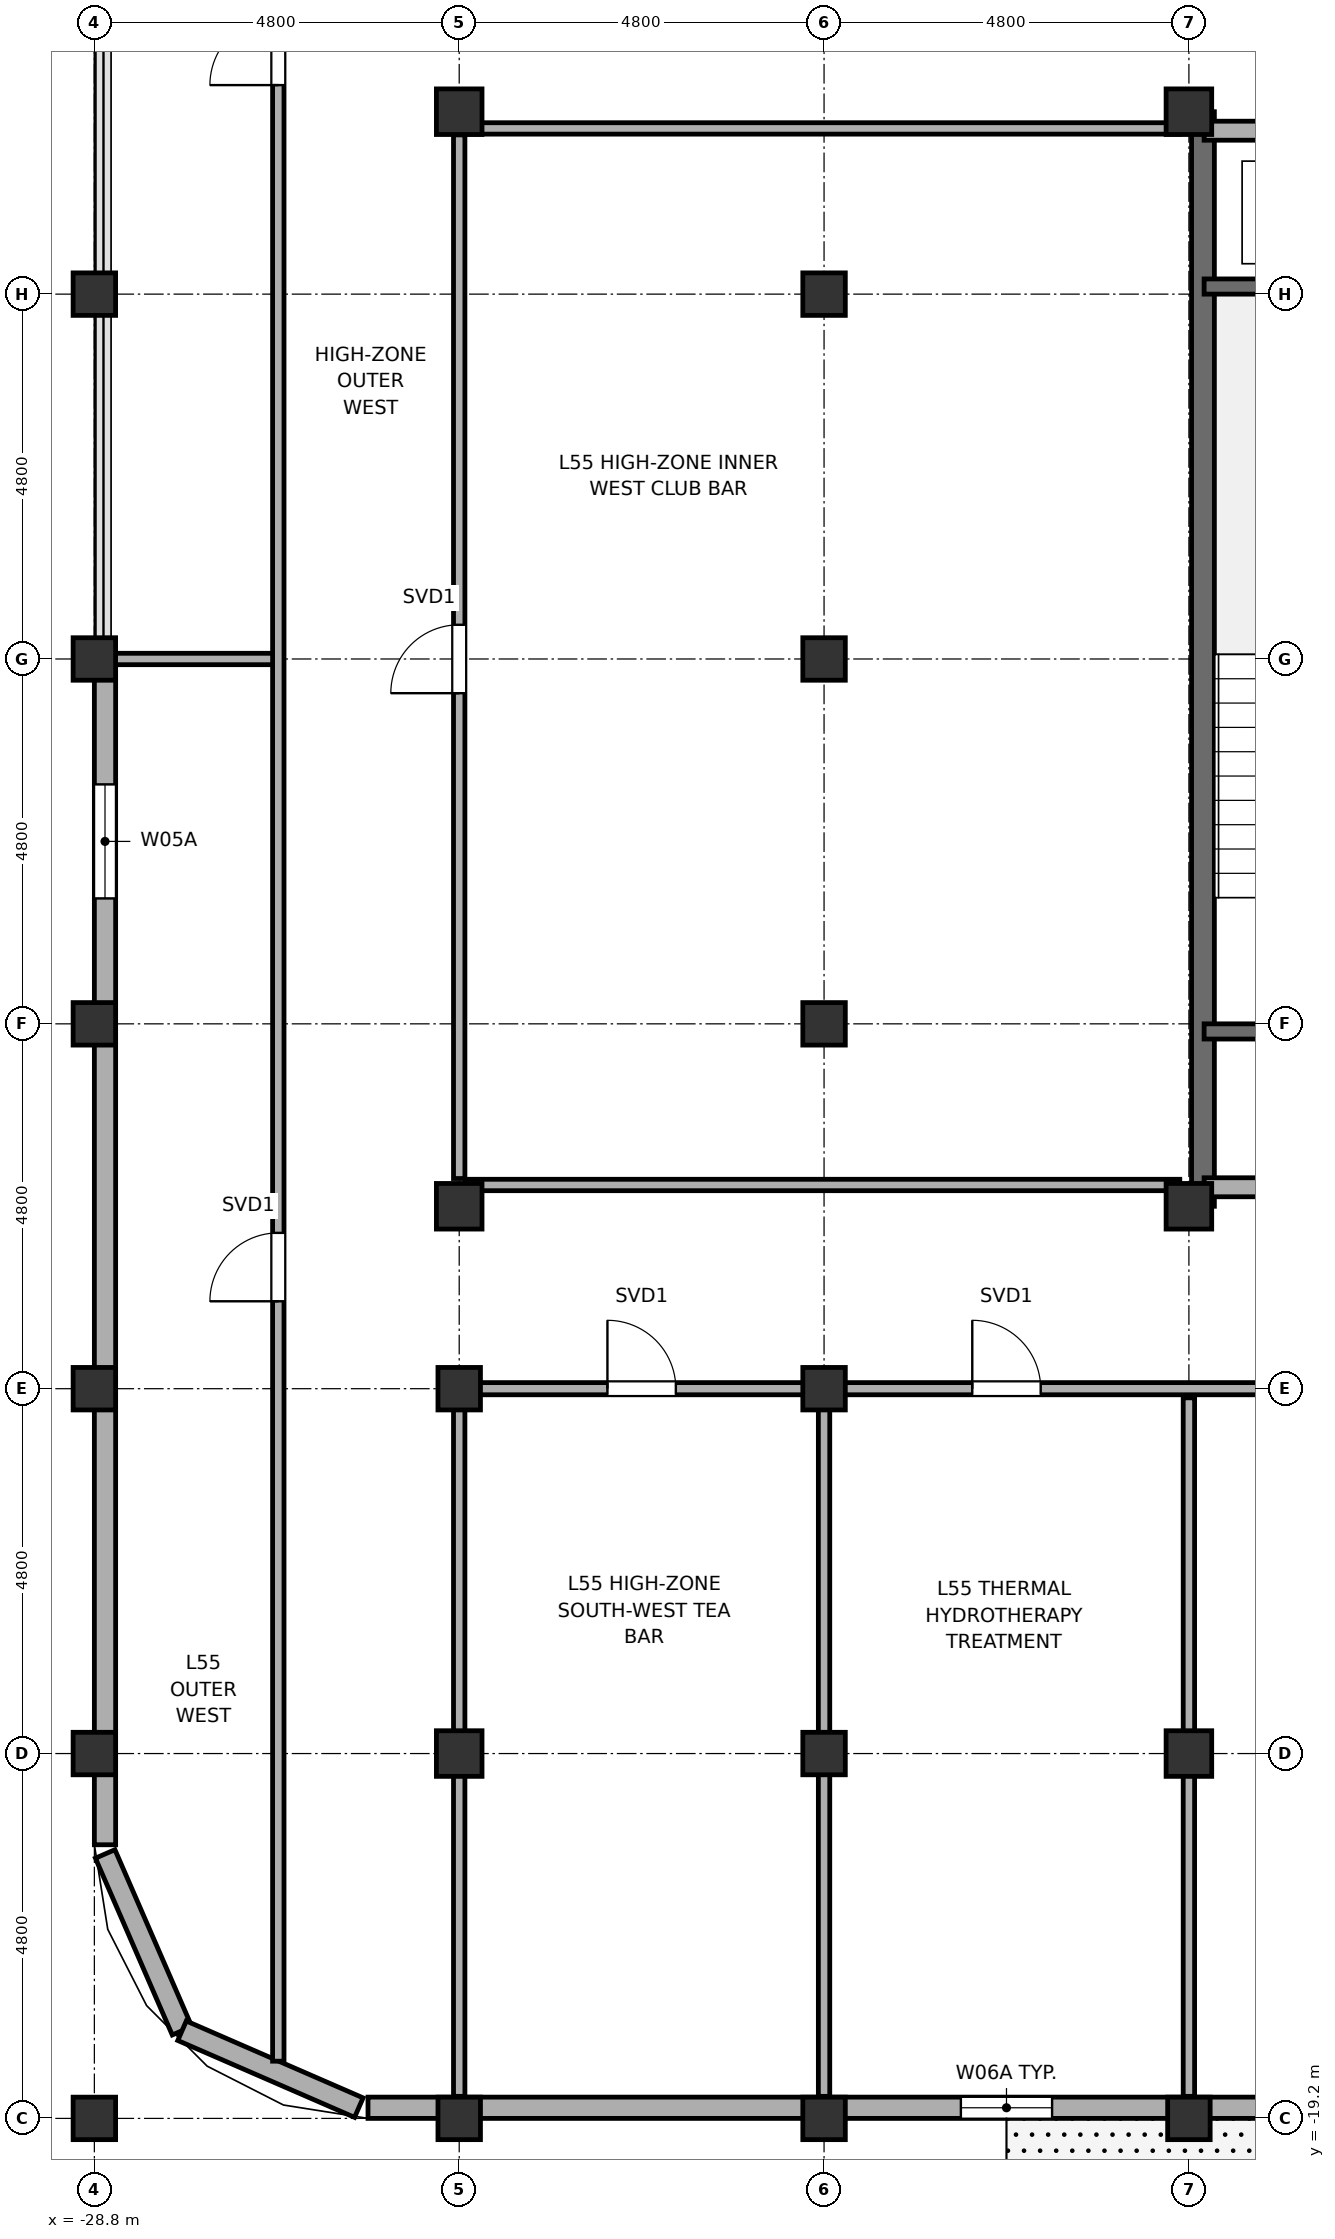
"""IFC4 building model, lengths in metres.
Left out: names, types, materials, properties, quantities, classifications, styles, units other than length and angle.
Written with IfcOpenShell. Run it as: python <this file> out.ifc"""

import sys

from ifc_helpers import new_model, si_unit, direction, frame, frame_2d, origin, origin_2d, place, context, subcontext, project, spatial, rectangle, hollow_rectangle, hollow_circle, extrude, element, fill, save


model = new_model("IFC4")
c1 = context("Model", 3, precision=1e-05, world=origin(), true_north=direction((0.0, 1.0)))
c2 = subcontext(c1, "Body", "Model", "MODEL_VIEW")
j1 = project(units=[si_unit("LENGTHUNIT", "METRE"), si_unit("PLANEANGLEUNIT", "RADIAN")], contexts=[c1])
p1 = place(None, origin())
s1 = spatial("IfcSite", under=j1, at=p1, CompositionType="ELEMENT")
p2 = place(p1, origin())
s2 = spatial("IfcBuilding", under=s1, at=p2, CompositionType="ELEMENT")
p3 = place(p2, frame((0.0, 0.0, 222.3)))
s3 = spatial("IfcBuildingStorey", under=s2, at=p3, CompositionType="ELEMENT", Elevation=222.3)
for number, where, z_axis, x_axis in (
    (1, (-28.8, -19.2, 0.0), (0.0, 0.0, 1.0), (1.0, 0.0, 0.0)),
    (2, (-28.8, -14.4, 0.0), (0.0, 0.0, 1.0), (1.0, 0.0, 0.0)),
    (3, (-28.8, -9.6, 0.0), (0.0, 0.0, 1.0), (1.0, 0.0, 0.0)),
    (4, (-28.8, -4.8, 0.0), (0.0, 0.0, 1.0), (1.0, 0.0, 0.0)),
    (5, (-28.8, 0.0, 0.0), (0.0, 0.0, 1.0), (1.0, 0.0, 0.0)),
    (6, (-28.8, 4.8, 0.0), (0.0, 0.0, 1.0), (1.0, 0.0, 0.0)),
    (7, (-24.0, -19.2, 0.0), (0.0, 0.0, 1.0), (1.0, 0.0, 0.0)),
):
    element("IfcColumn", number, at=place(p3, frame(where, z_axis=z_axis, x_axis=x_axis)), inside=s3, PredefinedType="COLUMN", context=c2, shape_type="SweptSolid", body=[
        extrude(hollow_circle(Radius=0.28, WallThickness=0.025, at=origin_2d()), origin(), (0.0, 0.0, 1.0), 3.85),
    ])
p4 = place(p3, frame((-24.0, -14.4, 0.0), z_axis=(0.0, 0.0, 1.0), x_axis=(1.0, 0.0, 0.0)))
e8 = element("IfcColumn", 8, at=p4, inside=s3, PredefinedType="COLUMN", context=c2, shape_type="SweptSolid", body=[
    extrude(hollow_rectangle(XDim=0.6, YDim=0.6, WallThickness=0.028, at=origin_2d()), origin(), (0.0, 0.0, 1.0), 3.85),
])
p5 = place(p3, frame((-24.0, -9.6, 0.0), z_axis=(0.0, 0.0, 1.0), x_axis=(1.0, 0.0, 0.0)))
e9 = element("IfcColumn", 9, at=p5, inside=s3, PredefinedType="COLUMN", context=c2, shape_type="SweptSolid", body=[
    extrude(hollow_circle(Radius=0.28, WallThickness=0.025, at=origin_2d()), origin(), (0.0, 0.0, 1.0), 3.85),
])
for number, where, z_axis, x_axis in (
    (10, (-24.0, -7.2, 0.0), (0.0, 0.0, 1.0), (1.0, 0.0, 0.0)),
    (11, (-24.0, 7.2, 0.0), (0.0, 0.0, 1.0), (1.0, 0.0, 0.0)),
):
    element("IfcColumn", number, at=place(p3, frame(where, z_axis=z_axis, x_axis=x_axis)), inside=s3, PredefinedType="COLUMN", context=c2, shape_type="SweptSolid", body=[
        extrude(hollow_rectangle(XDim=0.6, YDim=0.6, WallThickness=0.028, at=origin_2d()), origin(), (0.0, 0.0, 1.0), 3.85),
    ])
for number, where, z_axis, x_axis in (
    (12, (-19.2, -19.2, 0.0), (0.0, 0.0, 1.0), (1.0, 0.0, 0.0)),
    (13, (-19.2, -14.4, 0.0), (0.0, 0.0, 1.0), (1.0, 0.0, 0.0)),
    (14, (-19.2, -9.6, 0.0), (0.0, 0.0, 1.0), (1.0, 0.0, 0.0)),
    (15, (-19.2, -4.8, 0.0), (0.0, 0.0, 1.0), (1.0, 0.0, 0.0)),
    (16, (-19.2, 0.0, 0.0), (0.0, 0.0, 1.0), (1.0, 0.0, 0.0)),
    (17, (-19.2, 4.8, 0.0), (0.0, 0.0, 1.0), (1.0, 0.0, 0.0)),
    (18, (-14.4, -19.2, 0.0), (0.0, 0.0, 1.0), (1.0, 0.0, 0.0)),
):
    element("IfcColumn", number, at=place(p3, frame(where, z_axis=z_axis, x_axis=x_axis)), inside=s3, PredefinedType="COLUMN", context=c2, shape_type="SweptSolid", body=[
        extrude(hollow_circle(Radius=0.28, WallThickness=0.025, at=origin_2d()), origin(), (0.0, 0.0, 1.0), 3.85),
    ])
for number, where, z_axis, x_axis in (
    (19, (-14.4, -14.4, 0.0), (0.0, 0.0, 1.0), (1.0, 0.0, 0.0)),
    (20, (-14.4, -7.2, 0.0), (0.0, 0.0, 1.0), (1.0, 0.0, 0.0)),
    (21, (-14.4, 7.2, 0.0), (0.0, 0.0, 1.0), (1.0, 0.0, 0.0)),
):
    element("IfcColumn", number, at=place(p3, frame(where, z_axis=z_axis, x_axis=x_axis)), inside=s3, PredefinedType="COLUMN", context=c2, shape_type="SweptSolid", body=[
        extrude(hollow_rectangle(XDim=0.6, YDim=0.6, WallThickness=0.028, at=origin_2d()), origin(), (0.0, 0.0, 1.0), 3.85),
    ])
p6 = place(p3, frame((-14.215, -7.2, -0.18), z_axis=(0.0, 0.0, 1.0), x_axis=(0.0, 1.0, 0.0)))
e22 = element("IfcWall", 22, at=p6, inside=s3, PredefinedType="SHEAR", context=c2, shape_type="SweptSolid", body=[
    extrude(rectangle(XDim=14.4, YDim=0.3, at=frame_2d((7.2, 0.0))), origin(), (0.0, 0.0, 1.0), 3.85),
])
p7 = place(p3, frame((-28.658, -15.721, 0.0), z_axis=(0.0, 0.0, 1.0), x_axis=(0.398792985289, -0.917040977756, 0.0)))
e23 = element("IfcWall", 23, at=p7, inside=s3, PredefinedType="SOLIDWALL", context=c2, shape_type="SweptSolid", body=[
    extrude(rectangle(XDim=2.536, YDim=0.28, at=frame_2d((1.268, 0.0))), origin(), (0.0, 0.0, 1.0), 3.02),
])
p8 = place(p3, frame((-27.646, -18.047, 0.0), z_axis=(0.0, 0.0, 1.0), x_axis=(0.917060872934, -0.398747232384, 0.0)))
e24 = element("IfcWall", 24, at=p8, inside=s3, PredefinedType="SOLIDWALL", context=c2, shape_type="SweptSolid", body=[
    extrude(rectangle(XDim=2.536, YDim=0.28, at=frame_2d((1.268, 0.0))), origin(), (0.0, 0.0, 1.0), 2.27),
])
p9 = place(p3, frame((-25.2, -19.06, 0.0), z_axis=(0.0, 0.0, 1.0), x_axis=(1.0, 0.0, 0.0)))
e25 = element("IfcWall", 25, at=p9, inside=s3, PredefinedType="SOLIDWALL", context=c2, shape_type="SweptSolid", body=[
    extrude(rectangle(XDim=20.45, YDim=0.28, at=frame_2d((10.225, 0.0))), origin(), (0.0, 0.0, 1.0), 2.27),
])
p10 = place(p9, frame((12.3, 0.0, 0.0)))
e26 = element("IfcOpeningElement", 26, at=p10, cuts=e25, PredefinedType="OPENING", context=c2, shape_type="SweptSolid", body=[
    extrude(rectangle(XDim=1.8, YDim=2.02, at=frame_2d((0.9, 1.01))), frame((0.0, 0.155, 0.0), z_axis=(0.0, -1.0, 0.0), x_axis=(1.0, 0.0, 0.0)), (0.0, 0.0, 1.0), 0.31),
])
p11 = place(p9, frame((7.8, 0.0, 0.75)))
e27 = element("IfcOpeningElement", 27, at=p11, cuts=e25, PredefinedType="OPENING", context=c2, shape_type="SweptSolid", body=[
    extrude(rectangle(XDim=1.2, YDim=1.15, at=frame_2d((0.6, 0.575))), frame((0.0, 0.155, 0.0), z_axis=(0.0, -1.0, 0.0), x_axis=(1.0, 0.0, 0.0)), (0.0, 0.0, 1.0), 0.31),
])
p12 = place(p3, frame((-28.66, -15.6, 0.0), z_axis=(0.0, 0.0, 1.0), x_axis=(0.0, 1.0, 0.0)))
e28 = element("IfcWall", 28, at=p12, inside=s3, PredefinedType="SOLIDWALL", context=c2, shape_type="SweptSolid", body=[
    extrude(rectangle(XDim=15.58, YDim=0.28, at=frame_2d((7.79, 0.0))), origin(), (0.0, 0.0, 1.0), 2.27),
])
p13 = place(p12, frame((12.45, 0.0, 0.75)))
e29 = element("IfcOpeningElement", 29, at=p13, cuts=e28, PredefinedType="OPENING", context=c2, shape_type="SweptSolid", body=[
    extrude(rectangle(XDim=1.5, YDim=1.15, at=frame_2d((0.75, 0.575))), frame((0.0, 0.155, 0.0), z_axis=(0.0, -1.0, 0.0), x_axis=(1.0, 0.0, 0.0)), (0.0, 0.0, 1.0), 0.31),
])
p14 = place(p3, frame((-14.2, -6.95, 0.0), z_axis=(0.0, 0.0, 1.0), x_axis=(1.0, 0.0, 0.0)))
e30 = element("IfcWall", 30, at=p14, inside=s3, PredefinedType="SOLIDWALL", context=c2, shape_type="SweptSolid", body=[
    extrude(rectangle(XDim=9.4, YDim=0.25, at=frame_2d((4.7, 0.0))), origin(), (0.0, 0.0, 1.0), 2.27),
])
p15 = place(p14, frame((4.9, 0.0, 0.0)))
e31 = element("IfcOpeningElement", 31, at=p15, cuts=e30, PredefinedType="OPENING", context=c2, shape_type="SweptSolid", body=[
    extrude(rectangle(XDim=1.0, YDim=2.15, at=frame_2d((0.5, 1.075))), frame((0.0, 0.14, 0.0), z_axis=(0.0, -1.0, 0.0), x_axis=(1.0, 0.0, 0.0)), (0.0, 0.0, 1.0), 0.28),
])
p16 = place(p3, frame((-14.2, 6.95, 0.0), z_axis=(0.0, 0.0, 1.0), x_axis=(1.0, 0.0, 0.0)))
e32 = element("IfcWall", 32, at=p16, inside=s3, PredefinedType="SOLIDWALL", context=c2, shape_type="SweptSolid", body=[
    extrude(rectangle(XDim=9.4, YDim=0.25, at=frame_2d((4.7, 0.0))), origin(), (0.0, 0.0, 1.0), 2.27),
])
p17 = place(p16, frame((4.9, 0.0, 0.0)))
e33 = element("IfcOpeningElement", 33, at=p17, cuts=e32, PredefinedType="OPENING", context=c2, shape_type="SweptSolid", body=[
    extrude(rectangle(XDim=1.0, YDim=2.15, at=frame_2d((0.5, 1.075))), frame((0.0, 0.14, 0.0), z_axis=(0.0, -1.0, 0.0), x_axis=(1.0, 0.0, 0.0)), (0.0, 0.0, 1.0), 0.28),
])
for number, where, z_axis, x_axis in (
    (34, (-14.2, -4.9, -0.18), (0.0, 0.0, 1.0), (1.0, 0.0, 0.0)),
    (35, (-14.2, 4.9, -0.18), (0.0, 0.0, 1.0), (1.0, 0.0, 0.0)),
):
    element("IfcWall", number, at=place(p3, frame(where, z_axis=z_axis, x_axis=x_axis)), inside=s3, PredefinedType="SOLIDWALL", context=c2, shape_type="SweptSolid", body=[
        extrude(rectangle(XDim=3.65, YDim=0.2, at=frame_2d((1.825, 0.0))), origin(), (0.0, 0.0, 1.0), 3.85),
    ])
p18 = place(p3, frame((-23.92, -9.6, 0.0), z_axis=(0.0, 0.0, 1.0), x_axis=(1.0, 0.0, 0.0)))
e36 = element("IfcWall", 36, at=p18, inside=s3, PredefinedType="PARTITIONING", context=c2, shape_type="SweptSolid", body=[
    extrude(rectangle(XDim=47.84, YDim=0.16, at=frame_2d((23.92, 0.0))), origin(), (0.0, 0.0, 1.0), 2.27),
])
p19 = place(p18, frame((1.87, 0.0, 0.0)))
e37 = element("IfcOpeningElement", 37, at=p19, cuts=e36, PredefinedType="OPENING", context=c2, shape_type="SweptSolid", body=[
    extrude(rectangle(XDim=0.9, YDim=2.1, at=frame_2d((0.45, 1.05))), frame((0.0, 0.095, 0.0), z_axis=(0.0, -1.0, 0.0), x_axis=(1.0, 0.0, 0.0)), (0.0, 0.0, 1.0), 0.19),
])
p20 = place(p18, frame((45.07, 0.0, 0.0)))
e38 = element("IfcOpeningElement", 38, at=p20, cuts=e36, PredefinedType="OPENING", context=c2, shape_type="SweptSolid", body=[
    extrude(rectangle(XDim=0.9, YDim=2.1, at=frame_2d((0.45, 1.05))), frame((0.0, 0.095, 0.0), z_axis=(0.0, -1.0, 0.0), x_axis=(1.0, 0.0, 0.0)), (0.0, 0.0, 1.0), 0.19),
])
p21 = place(p18, frame((6.67, 0.0, 0.0)))
e39 = element("IfcOpeningElement", 39, at=p21, cuts=e36, PredefinedType="OPENING", context=c2, shape_type="SweptSolid", body=[
    extrude(rectangle(XDim=0.9, YDim=2.1, at=frame_2d((0.45, 1.05))), frame((0.0, 0.095, 0.0), z_axis=(0.0, -1.0, 0.0), x_axis=(1.0, 0.0, 0.0)), (0.0, 0.0, 1.0), 0.19),
])
p22 = place(p18, frame((11.47, 0.0, 0.0)))
e40 = element("IfcOpeningElement", 40, at=p22, cuts=e36, PredefinedType="OPENING", context=c2, shape_type="SweptSolid", body=[
    extrude(rectangle(XDim=0.9, YDim=2.1, at=frame_2d((0.45, 1.05))), frame((0.0, 0.095, 0.0), z_axis=(0.0, -1.0, 0.0), x_axis=(1.0, 0.0, 0.0)), (0.0, 0.0, 1.0), 0.19),
])
p23 = place(p18, frame((16.27, 0.0, 0.0)))
e41 = element("IfcOpeningElement", 41, at=p23, cuts=e36, PredefinedType="OPENING", context=c2, shape_type="SweptSolid", body=[
    extrude(rectangle(XDim=0.9, YDim=2.1, at=frame_2d((0.45, 1.05))), frame((0.0, 0.095, 0.0), z_axis=(0.0, -1.0, 0.0), x_axis=(1.0, 0.0, 0.0)), (0.0, 0.0, 1.0), 0.19),
])
p24 = place(p18, frame((34.89, 0.0, 0.0)))
e42 = element("IfcOpeningElement", 42, at=p24, cuts=e36, PredefinedType="OPENING", context=c2, shape_type="SweptSolid", body=[
    extrude(rectangle(XDim=0.92, YDim=2.15, at=frame_2d((0.46, 1.075))), frame((0.0, 0.095, 0.0), z_axis=(0.0, -1.0, 0.0), x_axis=(1.0, 0.0, 0.0)), (0.0, 0.0, 1.0), 0.19),
])
p25 = place(p18, frame((40.83, 0.0, 0.0)))
e43 = element("IfcOpeningElement", 43, at=p25, cuts=e36, PredefinedType="OPENING", context=c2, shape_type="SweptSolid", body=[
    extrude(rectangle(XDim=0.92, YDim=2.15, at=frame_2d((0.46, 1.075))), frame((0.0, 0.095, 0.0), z_axis=(0.0, -1.0, 0.0), x_axis=(1.0, 0.0, 0.0)), (0.0, 0.0, 1.0), 0.19),
])
p26 = place(p3, frame((-23.92, -6.92, 0.0), z_axis=(0.0, 0.0, 1.0), x_axis=(1.0, 0.0, 0.0)))
e44 = element("IfcWall", 44, at=p26, inside=s3, PredefinedType="PARTITIONING", context=c2, shape_type="SweptSolid", body=[
    extrude(rectangle(XDim=9.4, YDim=0.15, at=frame_2d((4.7, 0.0))), origin(), (0.0, 0.0, 1.0), 2.27),
])
p27 = place(p3, frame((-28.63, 0.0, 0.0), z_axis=(0.0, 0.0, 1.0), x_axis=(1.0, 0.0, 0.0)))
e45 = element("IfcWall", 45, at=p27, inside=s3, PredefinedType="PARTITIONING", context=c2, shape_type="SweptSolid", body=[
    extrude(rectangle(XDim=2.25, YDim=0.15, at=frame_2d((1.125, 0.0))), origin(), (0.0, 0.0, 1.0), 3.12),
])
p28 = place(p3, frame((-23.92, 6.98, 0.0), z_axis=(0.0, 0.0, 1.0), x_axis=(1.0, 0.0, 0.0)))
e46 = element("IfcWall", 46, at=p28, inside=s3, PredefinedType="PARTITIONING", context=c2, shape_type="SweptSolid", body=[
    extrude(rectangle(XDim=9.4, YDim=0.15, at=frame_2d((4.7, 0.0))), origin(), (0.0, 0.0, 1.0), 2.27),
])
p29 = place(p3, frame((-26.38, -18.447, 0.0), z_axis=(0.0, 0.0, 1.0), x_axis=(0.0, 1.0, 0.0)))
e47 = element("IfcWall", 47, at=p29, inside=s3, PredefinedType="PARTITIONING", context=c2, shape_type="SweptSolid", body=[
    extrude(rectangle(XDim=41.695, YDim=0.15, at=frame_2d((20.847, 0.0))), origin(), (0.0, 0.0, 1.0), 2.27),
])
p30 = place(p29, frame((9.997, 0.0, 0.0)))
e48 = element("IfcOpeningElement", 48, at=p30, cuts=e47, PredefinedType="OPENING", context=c2, shape_type="SweptSolid", body=[
    extrude(rectangle(XDim=0.9, YDim=2.1, at=frame_2d((0.45, 1.05))), frame((0.0, 0.09, 0.0), z_axis=(0.0, -1.0, 0.0), x_axis=(1.0, 0.0, 0.0)), (0.0, 0.0, 1.0), 0.18),
])
p31 = place(p29, frame((25.997, 0.0, 0.0)))
e49 = element("IfcOpeningElement", 49, at=p31, cuts=e47, PredefinedType="OPENING", context=c2, shape_type="SweptSolid", body=[
    extrude(rectangle(XDim=0.9, YDim=2.1, at=frame_2d((0.45, 1.05))), frame((0.0, 0.09, 0.0), z_axis=(0.0, -1.0, 0.0), x_axis=(1.0, 0.0, 0.0)), (0.0, 0.0, 1.0), 0.18),
])
p32 = place(p3, frame((-24.0, -18.91, 0.0), z_axis=(0.0, 0.0, 1.0), x_axis=(0.0, 1.0, 0.0)))
e50 = element("IfcWall", 50, at=p32, inside=s3, PredefinedType="PARTITIONING", context=c2, shape_type="SweptSolid", body=[
    extrude(rectangle(XDim=9.19, YDim=0.15, at=frame_2d((4.595, 0.0))), origin(), (0.0, 0.0, 1.0), 2.27),
])
p33 = place(p3, frame((-24.0, -6.835, 0.0), z_axis=(0.0, 0.0, 1.0), x_axis=(0.0, 1.0, 0.0)))
e51 = element("IfcWall", 51, at=p33, inside=s3, PredefinedType="PARTITIONING", context=c2, shape_type="SweptSolid", body=[
    extrude(rectangle(XDim=13.73, YDim=0.15, at=frame_2d((6.865, 0.0))), origin(), (0.0, 0.0, 1.0), 2.27),
])
p34 = place(p33, frame((6.385, 0.0, 0.0)))
e52 = element("IfcOpeningElement", 52, at=p34, cuts=e51, PredefinedType="OPENING", context=c2, shape_type="SweptSolid", body=[
    extrude(rectangle(XDim=0.9, YDim=2.1, at=frame_2d((0.45, 1.05))), frame((0.0, 0.09, 0.0), z_axis=(0.0, -1.0, 0.0), x_axis=(1.0, 0.0, 0.0)), (0.0, 0.0, 1.0), 0.18),
])
for number, where, z_axis, x_axis in (
    (53, (-19.2, -18.91, 0.0), (0.0, 0.0, 1.0), (0.0, 1.0, 0.0)),
    (54, (-14.4, -18.91, 0.0), (0.0, 0.0, 1.0), (0.0, 1.0, 0.0)),
):
    element("IfcWall", number, at=place(p3, frame(where, z_axis=z_axis, x_axis=x_axis)), inside=s3, PredefinedType="PARTITIONING", context=c2, shape_type="SweptSolid", body=[
        extrude(rectangle(XDim=9.19, YDim=0.15, at=frame_2d((4.595, 0.0))), origin(), (0.0, 0.0, 1.0), 2.27),
    ])
p35 = place(p13, origin())
e55 = element("IfcWindow", 55, at=p35, inside=s3, PartitioningType="SINGLE_PANEL", PredefinedType="WINDOW", context=c2, shape_type="SweptSolid", body=[
    extrude(rectangle(XDim=1.5, YDim=1.15, at=frame_2d((0.75, 0.575))), frame((0.0, 0.03, 0.0), z_axis=(0.0, -1.0, 0.0), x_axis=(1.0, 0.0, 0.0)), (0.0, 0.0, 1.0), 0.06),
])
fill(e29, e55)
p36 = place(p11, origin())
e56 = element("IfcWindow", 56, at=p36, inside=s3, PartitioningType="SINGLE_PANEL", PredefinedType="WINDOW", context=c2, shape_type="SweptSolid", body=[
    extrude(rectangle(XDim=1.2, YDim=1.15, at=frame_2d((0.6, 0.575))), frame((0.0, 0.03, 0.0), z_axis=(0.0, -1.0, 0.0), x_axis=(1.0, 0.0, 0.0)), (0.0, 0.0, 1.0), 0.06),
])
fill(e27, e56)
p37 = place(p34, origin())
e57 = element("IfcDoor", 57, at=p37, inside=s3, OperationType="SINGLE_SWING_RIGHT", PredefinedType="DOOR", context=c2, shape_type="SweptSolid", body=[
    extrude(rectangle(XDim=0.9, YDim=2.1, at=frame_2d((0.45, 1.05))), frame((0.0, 0.025, 0.0), z_axis=(0.0, -1.0, 0.0), x_axis=(1.0, 0.0, 0.0)), (0.0, 0.0, 1.0), 0.05),
])
fill(e52, e57)
p38 = place(p19, origin())
e58 = element("IfcDoor", 58, at=p38, inside=s3, OperationType="SINGLE_SWING_LEFT", PredefinedType="DOOR", context=c2, shape_type="SweptSolid", body=[
    extrude(rectangle(XDim=0.9, YDim=2.1, at=frame_2d((0.45, 1.05))), frame((0.0, 0.025, 0.0), z_axis=(0.0, -1.0, 0.0), x_axis=(1.0, 0.0, 0.0)), (0.0, 0.0, 1.0), 0.05),
])
fill(e37, e58)
p39 = place(p30, origin())
e59 = element("IfcDoor", 59, at=p39, inside=s3, OperationType="SINGLE_SWING_LEFT", PredefinedType="DOOR", context=c2, shape_type="SweptSolid", body=[
    extrude(rectangle(XDim=0.9, YDim=2.1, at=frame_2d((0.45, 1.05))), frame((0.0, 0.025, 0.0), z_axis=(0.0, -1.0, 0.0), x_axis=(1.0, 0.0, 0.0)), (0.0, 0.0, 1.0), 0.05),
])
fill(e48, e59)
p40 = place(p31, origin())
e60 = element("IfcDoor", 60, at=p40, inside=s3, OperationType="SINGLE_SWING_LEFT", PredefinedType="DOOR", context=c2, shape_type="SweptSolid", body=[
    extrude(rectangle(XDim=0.9, YDim=2.1, at=frame_2d((0.45, 1.05))), frame((0.0, 0.025, 0.0), z_axis=(0.0, -1.0, 0.0), x_axis=(1.0, 0.0, 0.0)), (0.0, 0.0, 1.0), 0.05),
])
fill(e49, e60)
p41 = place(p21, origin())
e61 = element("IfcDoor", 61, at=p41, inside=s3, OperationType="SINGLE_SWING_LEFT", PredefinedType="DOOR", context=c2, shape_type="SweptSolid", body=[
    extrude(rectangle(XDim=0.9, YDim=2.1, at=frame_2d((0.45, 1.05))), frame((0.0, 0.025, 0.0), z_axis=(0.0, -1.0, 0.0), x_axis=(1.0, 0.0, 0.0)), (0.0, 0.0, 1.0), 0.05),
])
fill(e39, e61)
save(model, sys.argv[1])
